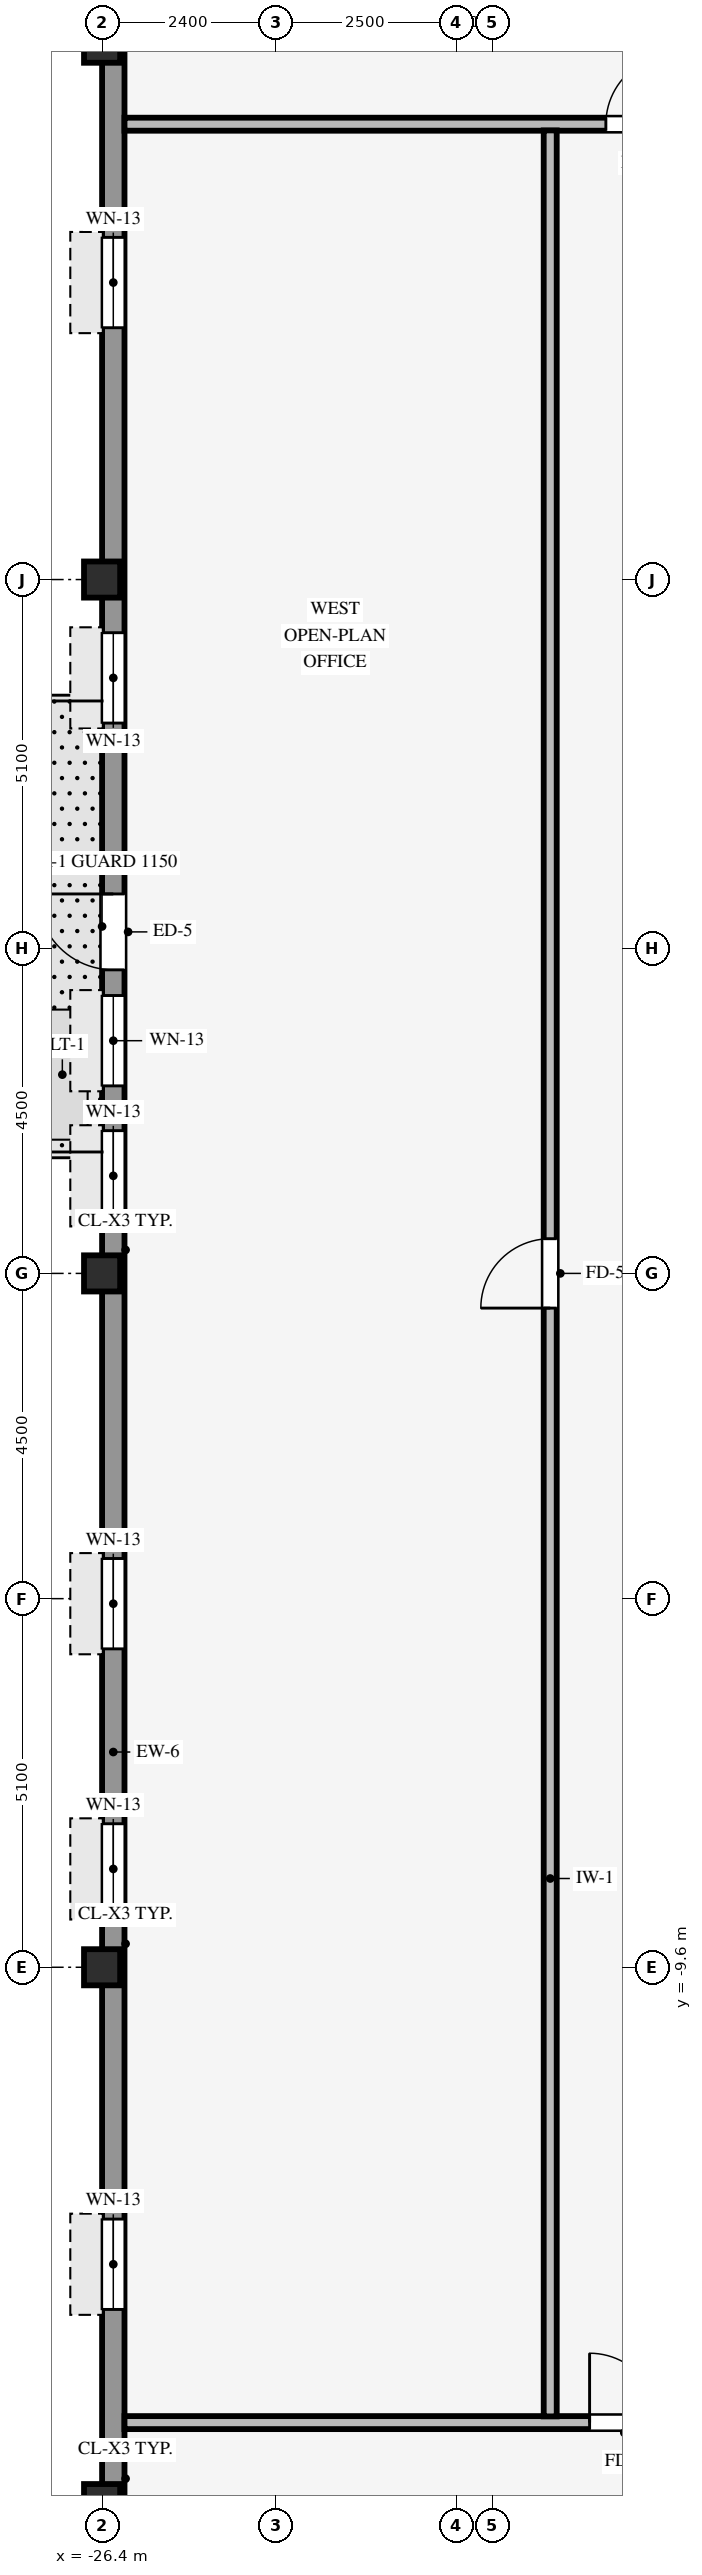
"""IFC4 building model, lengths in metres.
Left out: names, types, materials, properties, quantities, classifications, styles, units other than length and angle.
Written with IfcOpenShell. Run it as: python <this file> out.ifc"""

import sys

from ifc_helpers import new_model, si_unit, direction, frame, frame_2d, origin, origin_2d, place, context, subcontext, project, spatial, rectangle, hollow_rectangle, extrude, source, transform, mapped, element, fill, save


model = new_model("IFC4")
c1 = context("Model", 3, precision=1e-05, world=origin(), true_north=direction((0.0, 1.0)))
c2 = subcontext(c1, "Body", "Model", "MODEL_VIEW")
j1 = project(units=[si_unit("LENGTHUNIT", "METRE"), si_unit("PLANEANGLEUNIT", "RADIAN")], contexts=[c1])
p1 = place(None, origin())
s1 = spatial("IfcSite", under=j1, at=p1, CompositionType="ELEMENT")
p2 = place(p1, origin())
s2 = spatial("IfcBuilding", under=s1, at=p2, CompositionType="ELEMENT")
p3 = place(p2, frame((0.0, 0.0, 209.15)))
s3 = spatial("IfcBuildingStorey", under=s2, at=p3, CompositionType="ELEMENT", Elevation=209.15)
for number, where, z_axis, x_axis in (
    (1, (-26.4, -17.0, 0.0), (0.0, 0.0, 1.0), (1.0, 0.0, 0.0)),
    (2, (-26.4, -9.6, 0.0), (0.0, 0.0, 1.0), (1.0, 0.0, 0.0)),
    (3, (-26.4, 0.0, 0.0), (0.0, 0.0, 1.0), (1.0, 0.0, 0.0)),
    (4, (-26.4, 9.6, 0.0), (0.0, 0.0, 1.0), (1.0, 0.0, 0.0)),
    (5, (-26.4, 17.0, 0.0), (0.0, 0.0, 1.0), (1.0, 0.0, 0.0)),
):
    element("IfcColumn", number, at=place(p3, frame(where, z_axis=z_axis, x_axis=x_axis)), inside=s3, PredefinedType="COLUMN", context=c2, shape_type="SweptSolid", body=[
        extrude(hollow_rectangle(XDim=0.5, YDim=0.5, WallThickness=0.032, InnerFilletRadius=0.032, OuterFilletRadius=0.064, at=origin_2d()), origin(), (0.0, 0.0, 1.0), 3.37),
    ])
p4 = place(p3, frame((-26.245, -16.994, 0.0), z_axis=(0.0, 0.0, 1.0), x_axis=(0.0, 1.0, 0.0)))
e6 = element("IfcWall", 6, at=p4, inside=s3, PredefinedType="STANDARD", context=c2, shape_type="SweptSolid", body=[
    extrude(rectangle(XDim=33.988, YDim=0.31, at=frame_2d((16.994, 0.0))), origin(), (0.0, 0.0, 1.0), 2.705),
])
p5 = place(p4, frame((21.194, 0.0, 0.0)))
e7 = element("IfcOpeningElement", 7, at=p5, cuts=e6, PredefinedType="OPENING", context=c2, shape_type="SweptSolid", body=[
    extrude(rectangle(XDim=1.05, YDim=2.1, at=frame_2d((0.525, 1.05))), frame((0.0, 0.165, 0.0), z_axis=(0.0, -1.0, 0.0), x_axis=(1.0, 0.0, 0.0)), (0.0, 0.0, 1.0), 0.33),
])
p6 = place(p4, frame((2.66, 0.0, 0.8)))
e8 = element("IfcOpeningElement", 8, at=p6, cuts=e6, PredefinedType="OPENING", context=c2, shape_type="SweptSolid", body=[
    extrude(rectangle(XDim=1.25, YDim=1.52, at=frame_2d((0.625, 0.76))), frame((0.0, 0.165, 0.0), z_axis=(0.0, -1.0, 0.0), x_axis=(1.0, 0.0, 0.0)), (0.0, 0.0, 1.0), 0.33),
])
p7 = place(p4, frame((8.13, 0.0, 0.8)))
e9 = element("IfcOpeningElement", 9, at=p7, cuts=e6, PredefinedType="OPENING", context=c2, shape_type="SweptSolid", body=[
    extrude(rectangle(XDim=1.25, YDim=1.52, at=frame_2d((0.625, 0.76))), frame((0.0, 0.165, 0.0), z_axis=(0.0, -1.0, 0.0), x_axis=(1.0, 0.0, 0.0)), (0.0, 0.0, 1.0), 0.33),
])
p8 = place(p4, frame((11.799, 0.0, 0.8)))
e10 = element("IfcOpeningElement", 10, at=p8, cuts=e6, PredefinedType="OPENING", context=c2, shape_type="SweptSolid", body=[
    extrude(rectangle(XDim=1.25, YDim=1.52, at=frame_2d((0.625, 0.76))), frame((0.0, 0.165, 0.0), z_axis=(0.0, -1.0, 0.0), x_axis=(1.0, 0.0, 0.0)), (0.0, 0.0, 1.0), 0.33),
])
p9 = place(p4, frame((17.719, 0.0, 0.8)))
e11 = element("IfcOpeningElement", 11, at=p9, cuts=e6, PredefinedType="OPENING", context=c2, shape_type="SweptSolid", body=[
    extrude(rectangle(XDim=1.25, YDim=1.52, at=frame_2d((0.625, 0.76))), frame((0.0, 0.165, 0.0), z_axis=(0.0, -1.0, 0.0), x_axis=(1.0, 0.0, 0.0)), (0.0, 0.0, 1.0), 0.33),
])
p10 = place(p4, frame((19.589, 0.0, 0.8)))
e12 = element("IfcOpeningElement", 12, at=p10, cuts=e6, PredefinedType="OPENING", context=c2, shape_type="SweptSolid", body=[
    extrude(rectangle(XDim=1.25, YDim=1.52, at=frame_2d((0.625, 0.76))), frame((0.0, 0.165, 0.0), z_axis=(0.0, -1.0, 0.0), x_axis=(1.0, 0.0, 0.0)), (0.0, 0.0, 1.0), 0.33),
])
p11 = place(p4, frame((24.608, 0.0, 0.8)))
e13 = element("IfcOpeningElement", 13, at=p11, cuts=e6, PredefinedType="OPENING", context=c2, shape_type="SweptSolid", body=[
    extrude(rectangle(XDim=1.25, YDim=1.52, at=frame_2d((0.625, 0.76))), frame((0.0, 0.165, 0.0), z_axis=(0.0, -1.0, 0.0), x_axis=(1.0, 0.0, 0.0)), (0.0, 0.0, 1.0), 0.33),
])
p12 = place(p4, frame((30.078, 0.0, 0.8)))
e14 = element("IfcOpeningElement", 14, at=p12, cuts=e6, PredefinedType="OPENING", context=c2, shape_type="SweptSolid", body=[
    extrude(rectangle(XDim=1.25, YDim=1.52, at=frame_2d((0.625, 0.76))), frame((0.0, 0.165, 0.0), z_axis=(0.0, -1.0, 0.0), x_axis=(1.0, 0.0, 0.0)), (0.0, 0.0, 1.0), 0.33),
])
p13 = place(p3, frame((-26.09, -15.9, 0.0), z_axis=(0.0, 0.0, 1.0), x_axis=(1.0, 0.0, 0.0)))
e15 = element("IfcWall", 15, at=p13, inside=s3, PredefinedType="PARTITIONING", context=c2, shape_type="SweptSolid", body=[
    extrude(rectangle(XDim=35.09, YDim=0.18, at=frame_2d((17.545, 0.0))), origin(), (0.0, 0.0, 1.0), 3.36),
])
p14 = place(p13, frame((13.265, 0.0, 0.0)))
e16 = element("IfcOpeningElement", 16, at=p14, cuts=e15, PredefinedType="OPENING", context=c2, shape_type="SweptSolid", body=[
    extrude(rectangle(XDim=0.96, YDim=2.1, at=frame_2d((0.48, 1.05))), frame((0.0, 0.1, 0.0), z_axis=(0.0, -1.0, 0.0), x_axis=(1.0, 0.0, 0.0)), (0.0, 0.0, 1.0), 0.2),
])
p15 = place(p13, frame((22.44, 0.0, 0.0)))
e17 = element("IfcOpeningElement", 17, at=p15, cuts=e15, PredefinedType="OPENING", context=c2, shape_type="SweptSolid", body=[
    extrude(rectangle(XDim=0.96, YDim=2.1, at=frame_2d((0.48, 1.05))), frame((0.0, 0.1, 0.0), z_axis=(0.0, -1.0, 0.0), x_axis=(1.0, 0.0, 0.0)), (0.0, 0.0, 1.0), 0.2),
])
p16 = place(p13, frame((29.235, 0.0, 0.0)))
e18 = element("IfcOpeningElement", 18, at=p16, cuts=e15, PredefinedType="OPENING", context=c2, shape_type="SweptSolid", body=[
    extrude(rectangle(XDim=0.96, YDim=2.1, at=frame_2d((0.48, 1.05))), frame((0.0, 0.1, 0.0), z_axis=(0.0, -1.0, 0.0), x_axis=(1.0, 0.0, 0.0)), (0.0, 0.0, 1.0), 0.2),
])
p17 = place(p13, frame((6.435, 0.0, 0.0)))
e19 = element("IfcOpeningElement", 19, at=p17, cuts=e15, PredefinedType="OPENING", context=c2, shape_type="SweptSolid", body=[
    extrude(rectangle(XDim=0.96, YDim=2.1, at=frame_2d((0.48, 1.05))), frame((0.0, 0.1, 0.0), z_axis=(0.0, -1.0, 0.0), x_axis=(1.0, 0.0, 0.0)), (0.0, 0.0, 1.0), 0.2),
])
p18 = place(p3, frame((-26.09, 15.9, 0.0), z_axis=(0.0, 0.0, 1.0), x_axis=(1.0, 0.0, 0.0)))
e20 = element("IfcWall", 20, at=p18, inside=s3, PredefinedType="PARTITIONING", context=c2, shape_type="SweptSolid", body=[
    extrude(rectangle(XDim=35.09, YDim=0.18, at=frame_2d((17.545, 0.0))), origin(), (0.0, 0.0, 1.0), 3.36),
])
p19 = place(p18, frame((21.305, 0.0, 0.0)))
e21 = element("IfcOpeningElement", 21, at=p19, cuts=e20, PredefinedType="OPENING", context=c2, shape_type="SweptSolid", body=[
    extrude(rectangle(XDim=0.96, YDim=2.1, at=frame_2d((0.48, 1.05))), frame((0.0, 0.1, 0.0), z_axis=(0.0, -1.0, 0.0), x_axis=(1.0, 0.0, 0.0)), (0.0, 0.0, 1.0), 0.2),
])
p20 = place(p18, frame((6.66, 0.0, 0.0)))
e22 = element("IfcOpeningElement", 22, at=p20, cuts=e20, PredefinedType="OPENING", context=c2, shape_type="SweptSolid", body=[
    extrude(rectangle(XDim=0.96, YDim=2.1, at=frame_2d((0.48, 1.05))), frame((0.0, 0.1, 0.0), z_axis=(0.0, -1.0, 0.0), x_axis=(1.0, 0.0, 0.0)), (0.0, 0.0, 1.0), 0.2),
])
p21 = place(p3, frame((-20.2, -15.814, 0.0), z_axis=(0.0, 0.0, 1.0), x_axis=(0.0, 1.0, 0.0)))
e23 = element("IfcWall", 23, at=p21, inside=s3, PredefinedType="PARTITIONING", context=c2, shape_type="SweptSolid", body=[
    extrude(rectangle(XDim=31.628, YDim=0.18, at=frame_2d((15.814, 0.0))), origin(), (0.0, 0.0, 1.0), 3.36),
])
p22 = place(p21, frame((15.334, 0.0, 0.0)))
e24 = element("IfcOpeningElement", 24, at=p22, cuts=e23, PredefinedType="OPENING", context=c2, shape_type="SweptSolid", body=[
    extrude(rectangle(XDim=0.96, YDim=2.1, at=frame_2d((0.48, 1.05))), frame((0.0, 0.1, 0.0), z_axis=(0.0, -1.0, 0.0), x_axis=(1.0, 0.0, 0.0)), (0.0, 0.0, 1.0), 0.2),
])
m1 = source(origin(), c2, "Body", "SweptSolid", [
    extrude(rectangle(XDim=1.05, YDim=2.1, at=frame_2d((0.525, 1.05))), frame((0.0, 0.025, 0.0), z_axis=(0.0, -1.0, 0.0), x_axis=(1.0, 0.0, 0.0)), (0.0, 0.0, 1.0), 0.05),
])
p23 = place(p5, origin())
e25 = element("IfcDoor", 25, at=p23, inside=s3, OperationType="SINGLE_SWING_RIGHT", PredefinedType="DOOR", context=c2, shape_type="MappedRepresentation", body=[
    mapped(m1, transform((0.0, 0.0, 0.0), scale=1.0)),
])
fill(e7, e25)
m2 = source(origin(), c2, "Body", "SweptSolid", [
    extrude(rectangle(XDim=1.25, YDim=1.52, at=frame_2d((0.625, 0.76))), frame((0.0, 0.03, 0.0), z_axis=(0.0, -1.0, 0.0), x_axis=(1.0, 0.0, 0.0)), (0.0, 0.0, 1.0), 0.06),
])
p24 = place(p6, origin())
e26 = element("IfcWindow", 26, at=p24, inside=s3, PartitioningType="SINGLE_PANEL", PredefinedType="WINDOW", context=c2, shape_type="MappedRepresentation", body=[
    mapped(m2, transform((0.0, 0.0, 0.0), scale=1.0)),
])
fill(e8, e26)
p25 = place(p7, origin())
e27 = element("IfcWindow", 27, at=p25, inside=s3, PartitioningType="SINGLE_PANEL", PredefinedType="WINDOW", context=c2, shape_type="MappedRepresentation", body=[
    mapped(m2, transform((0.0, 0.0, 0.0), scale=1.0)),
])
fill(e9, e27)
p26 = place(p8, origin())
e28 = element("IfcWindow", 28, at=p26, inside=s3, PartitioningType="SINGLE_PANEL", PredefinedType="WINDOW", context=c2, shape_type="MappedRepresentation", body=[
    mapped(m2, transform((0.0, 0.0, 0.0), scale=1.0)),
])
fill(e10, e28)
p27 = place(p9, origin())
e29 = element("IfcWindow", 29, at=p27, inside=s3, PartitioningType="SINGLE_PANEL", PredefinedType="WINDOW", context=c2, shape_type="MappedRepresentation", body=[
    mapped(m2, transform((0.0, 0.0, 0.0), scale=1.0)),
])
fill(e11, e29)
p28 = place(p10, origin())
e30 = element("IfcWindow", 30, at=p28, inside=s3, PartitioningType="SINGLE_PANEL", PredefinedType="WINDOW", context=c2, shape_type="MappedRepresentation", body=[
    mapped(m2, transform((0.0, 0.0, 0.0), scale=1.0)),
])
fill(e12, e30)
p29 = place(p11, origin())
e31 = element("IfcWindow", 31, at=p29, inside=s3, PartitioningType="SINGLE_PANEL", PredefinedType="WINDOW", context=c2, shape_type="MappedRepresentation", body=[
    mapped(m2, transform((0.0, 0.0, 0.0), scale=1.0)),
])
fill(e13, e31)
p30 = place(p12, origin())
e32 = element("IfcWindow", 32, at=p30, inside=s3, PartitioningType="SINGLE_PANEL", PredefinedType="WINDOW", context=c2, shape_type="MappedRepresentation", body=[
    mapped(m2, transform((0.0, 0.0, 0.0), scale=1.0)),
])
fill(e14, e32)
m3 = source(origin(), c2, "Body", "SweptSolid", [
    extrude(rectangle(XDim=0.96, YDim=2.1, at=frame_2d((0.48, 1.05))), frame((0.0, 0.025, 0.0), z_axis=(0.0, -1.0, 0.0), x_axis=(1.0, 0.0, 0.0)), (0.0, 0.0, 1.0), 0.05),
])
p31 = place(p22, origin())
e33 = element("IfcDoor", 33, at=p31, inside=s3, OperationType="SINGLE_SWING_LEFT", PredefinedType="DOOR", context=c2, shape_type="MappedRepresentation", body=[
    mapped(m3, transform((0.0, 0.0, 0.0), scale=1.0)),
])
fill(e24, e33)
p32 = place(p20, origin())
e34 = element("IfcDoor", 34, at=p32, inside=s3, OperationType="SINGLE_SWING_RIGHT", PredefinedType="DOOR", context=c2, shape_type="MappedRepresentation", body=[
    mapped(m3, transform((0.0, 0.0, 0.0), scale=1.0)),
])
fill(e22, e34)
p33 = place(p17, origin())
e35 = element("IfcDoor", 35, at=p33, inside=s3, OperationType="SINGLE_SWING_LEFT", PredefinedType="DOOR", context=c2, shape_type="MappedRepresentation", body=[
    mapped(m3, transform((0.0, 0.0, 0.0), scale=1.0)),
])
fill(e19, e35)
save(model, sys.argv[1])
